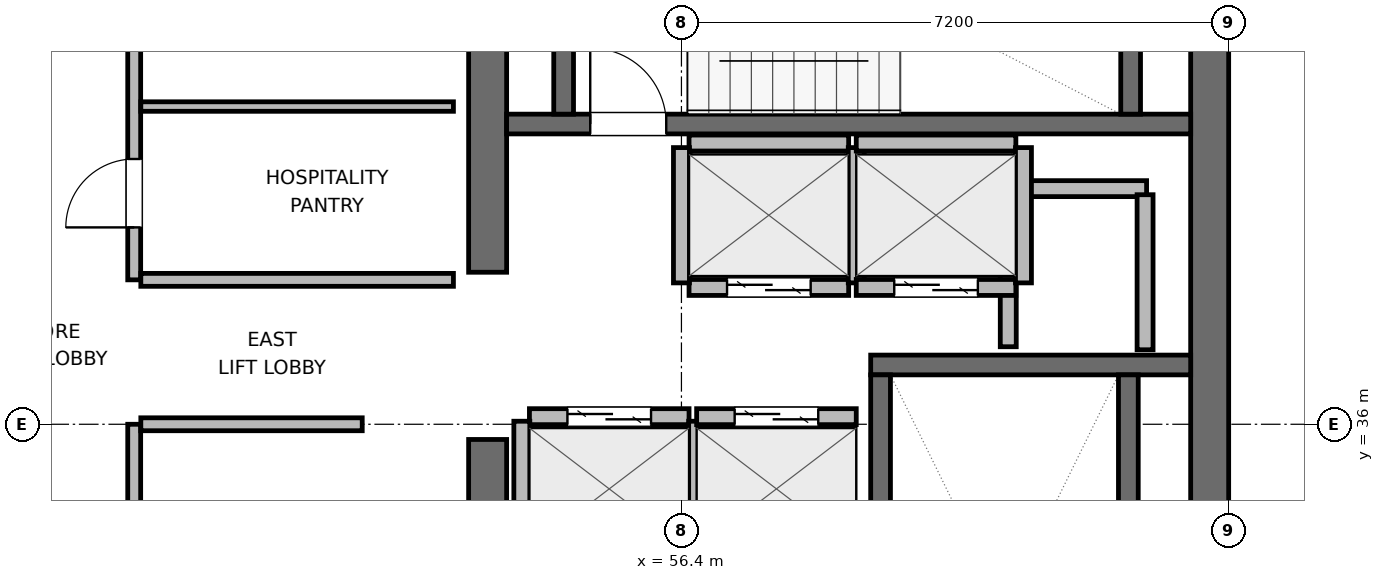
"""IFC4 building model, lengths in metres.
Left out: names, types, materials, properties, quantities, classifications, styles, units other than length and angle.
Written with IfcOpenShell. Run it as: python <this file> out.ifc"""

import sys

from ifc_helpers import new_model, si_unit, direction, frame, frame_2d, origin, place, context, subcontext, project, spatial, rectangle, extrude, element, fill, save


model = new_model("IFC4")
c1 = context("Model", 3, precision=1e-05, world=origin(), true_north=direction((0.0, 1.0)))
c2 = subcontext(c1, "Body", "Model", "MODEL_VIEW")
j1 = project(units=[si_unit("LENGTHUNIT", "METRE"), si_unit("PLANEANGLEUNIT", "RADIAN")], contexts=[c1])
p1 = place(None, origin())
s1 = spatial("IfcSite", under=j1, at=p1, CompositionType="ELEMENT")
p2 = place(p1, origin())
s2 = spatial("IfcBuilding", under=s1, at=p2, CompositionType="ELEMENT")
p3 = place(p2, frame((0.0, 0.0, 325.8)))
s3 = spatial("IfcBuildingStorey", under=s2, at=p3, CompositionType="ELEMENT", Elevation=325.8)
p4 = place(p3, frame((53.85, 27.85, 0.0), z_axis=(0.0, 0.0, 1.0), x_axis=(0.0, 1.0, 0.0)))
e1 = element("IfcWall", 1, at=p4, inside=s3, PredefinedType="SHEAR", context=c2, shape_type="SweptSolid", body=[
    extrude(rectangle(XDim=7.95, YDim=0.5, at=frame_2d((3.975, 0.0))), origin(), (0.0, 0.0, 1.0), 3.9),
])
p5 = place(p3, frame((53.85, 38.0, 0.0), z_axis=(0.0, 0.0, 1.0), x_axis=(0.0, 1.0, 0.0)))
e2 = element("IfcWall", 2, at=p5, inside=s3, PredefinedType="SHEAR", context=c2, shape_type="SweptSolid", body=[
    extrude(rectangle(XDim=6.15, YDim=0.5, at=frame_2d((3.075, 0.0))), origin(), (0.0, 0.0, 1.0), 3.9),
])
p6 = place(p3, frame((63.35, 27.6, 0.0), z_axis=(0.0, 0.0, 1.0), x_axis=(0.0, 1.0, 0.0)))
e3 = element("IfcWall", 3, at=p6, inside=s3, PredefinedType="SHEAR", context=c2, shape_type="SweptSolid", body=[
    extrude(rectangle(XDim=16.8, YDim=0.5, at=frame_2d((8.4, 0.0))), origin(), (0.0, 0.0, 1.0), 3.9),
])
p7 = place(p3, frame((58.89, 36.78, 0.0), z_axis=(0.0, 0.0, 1.0), x_axis=(1.0, 0.0, 0.0)))
e4 = element("IfcWall", 4, at=p7, inside=s3, PredefinedType="SHEAR", context=c2, shape_type="SweptSolid", body=[
    extrude(rectangle(XDim=4.21, YDim=0.26, at=frame_2d((2.105, 0.0))), origin(), (0.0, 0.0, 1.0), 3.9),
])
p8 = place(p3, frame((59.02, 29.05, 0.0), z_axis=(0.0, 0.0, 1.0), x_axis=(0.0, 1.0, 0.0)))
e5 = element("IfcWall", 5, at=p8, inside=s3, PredefinedType="SHEAR", context=c2, shape_type="SweptSolid", body=[
    extrude(rectangle(XDim=7.6, YDim=0.26, at=frame_2d((3.8, 0.0))), origin(), (0.0, 0.0, 1.0), 3.9),
])
p9 = place(p8, frame((0.3, 0.0, 0.0)))
e6 = element("IfcOpeningElement", 6, at=p9, cuts=e5, PredefinedType="OPENING", context=c2, shape_type="SweptSolid", body=[
    extrude(rectangle(XDim=1.0, YDim=2.04, at=frame_2d((0.5, 1.02))), frame((0.0, 0.14, 0.0), z_axis=(0.0, -1.0, 0.0), x_axis=(1.0, 0.0, 0.0)), (0.0, 0.0, 1.0), 0.28),
])
p10 = place(p3, frame((62.28, 29.05, 0.0), z_axis=(0.0, 0.0, 1.0), x_axis=(0.0, 1.0, 0.0)))
e7 = element("IfcWall", 7, at=p10, inside=s3, PredefinedType="SHEAR", context=c2, shape_type="SweptSolid", body=[
    extrude(rectangle(XDim=7.6, YDim=0.26, at=frame_2d((3.8, 0.0))), origin(), (0.0, 0.0, 1.0), 3.9),
])
p11 = place(p3, frame((54.1, 39.95, 0.0), z_axis=(0.0, 0.0, 1.0), x_axis=(1.0, 0.0, 0.0)))
e8 = element("IfcWall", 8, at=p11, inside=s3, PredefinedType="SHEAR", context=c2, shape_type="SweptSolid", body=[
    extrude(rectangle(XDim=9.0, YDim=0.26, at=frame_2d((4.5, 0.0))), origin(), (0.0, 0.0, 1.0), 3.9),
])
p12 = place(p11, frame((1.1, 0.0, 0.0)))
e9 = element("IfcOpeningElement", 9, at=p12, cuts=e8, PredefinedType="OPENING", context=c2, shape_type="SweptSolid", body=[
    extrude(rectangle(XDim=1.0, YDim=2.04, at=frame_2d((0.5, 1.02))), frame((0.0, 0.14, 0.0), z_axis=(0.0, -1.0, 0.0), x_axis=(1.0, 0.0, 0.0)), (0.0, 0.0, 1.0), 0.28),
])
for number, where, z_axis, x_axis in (
    (10, (54.85, 40.08, 0.0), (0.0, 0.0, 1.0), (0.0, 1.0, 0.0)),
    (11, (62.31, 40.08, 0.0), (0.0, 0.0, 1.0), (0.0, 1.0, 0.0)),
):
    element("IfcWall", number, at=place(p3, frame(where, z_axis=z_axis, x_axis=x_axis)), inside=s3, PredefinedType="SHEAR", context=c2, shape_type="SweptSolid", body=[
        extrude(rectangle(XDim=2.94, YDim=0.26, at=frame_2d((1.47, 0.0))), origin(), (0.0, 0.0, 1.0), 3.9),
    ])
p13 = place(p3, frame((60.72, 39.1, 0.0), z_axis=(0.0, 0.0, 1.0), x_axis=(1.0, 0.0, 0.0)))
e12 = element("IfcWall", 12, at=p13, inside=s3, PredefinedType="PARTITIONING", context=c2, shape_type="SweptSolid", body=[
    extrude(rectangle(XDim=1.8, YDim=0.21, at=frame_2d((0.9, 0.0))), origin(), (0.0, 0.0, 1.0), 3.68),
])
p14 = place(p3, frame((60.7, 37.02, 0.0), z_axis=(0.0, 0.0, 1.0), x_axis=(0.0, 1.0, 0.0)))
e13 = element("IfcWall", 13, at=p14, inside=s3, PredefinedType="PARTITIONING", context=c2, shape_type="SweptSolid", body=[
    extrude(rectangle(XDim=1.96, YDim=0.21, at=frame_2d((0.98, 0.0))), origin(), (0.0, 0.0, 1.0), 3.68),
])
p15 = place(p3, frame((62.5, 36.98, 0.0), z_axis=(0.0, 0.0, 1.0), x_axis=(0.0, 1.0, 0.0)))
e14 = element("IfcWall", 14, at=p15, inside=s3, PredefinedType="PARTITIONING", context=c2, shape_type="SweptSolid", body=[
    extrude(rectangle(XDim=2.04, YDim=0.21, at=frame_2d((1.02, 0.0))), origin(), (0.0, 0.0, 1.0), 3.68),
])
p16 = place(p3, frame((54.4, 36.1, 0.0), z_axis=(0.0, 0.0, 1.0), x_axis=(1.0, 0.0, 0.0)))
e15 = element("IfcWall", 15, at=p16, inside=s3, PredefinedType="PARTITIONING", context=c2, shape_type="SweptSolid", body=[
    extrude(rectangle(XDim=2.1, YDim=0.21, at=frame_2d((1.05, 0.0))), origin(), (0.0, 0.0, 1.0), 3.68),
])
p17 = place(p16, frame((0.5, 0.0, 0.0)))
e16 = element("IfcOpeningElement", 16, at=p17, cuts=e15, PredefinedType="OPENING", context=c2, shape_type="SweptSolid", body=[
    extrude(rectangle(XDim=1.1, YDim=2.04, at=frame_2d((0.55, 1.02))), frame((0.0, 0.115, 0.0), z_axis=(0.0, -1.0, 0.0), x_axis=(1.0, 0.0, 0.0)), (0.0, 0.0, 1.0), 0.23),
])
for number, where, z_axis, x_axis in (
    (17, (54.3, 34.26, 0.0), (0.0, 0.0, 1.0), (0.0, 1.0, 0.0)),
    (18, (56.6, 34.26, 0.0), (0.0, 0.0, 1.0), (0.0, 1.0, 0.0)),
):
    element("IfcWall", number, at=place(p3, frame(where, z_axis=z_axis, x_axis=x_axis)), inside=s3, PredefinedType="PARTITIONING", context=c2, shape_type="SweptSolid", body=[
        extrude(rectangle(XDim=1.78, YDim=0.21, at=frame_2d((0.89, 0.0))), origin(), (0.0, 0.0, 1.0), 3.68),
    ])
p18 = place(p3, frame((56.6, 36.1, 0.0), z_axis=(0.0, 0.0, 1.0), x_axis=(1.0, 0.0, 0.0)))
e19 = element("IfcWall", 19, at=p18, inside=s3, PredefinedType="PARTITIONING", context=c2, shape_type="SweptSolid", body=[
    extrude(rectangle(XDim=2.1, YDim=0.21, at=frame_2d((1.05, 0.0))), origin(), (0.0, 0.0, 1.0), 3.68),
])
p19 = place(p18, frame((0.5, 0.0, 0.0)))
e20 = element("IfcOpeningElement", 20, at=p19, cuts=e19, PredefinedType="OPENING", context=c2, shape_type="SweptSolid", body=[
    extrude(rectangle(XDim=1.1, YDim=2.04, at=frame_2d((0.55, 1.02))), frame((0.0, 0.115, 0.0), z_axis=(0.0, -1.0, 0.0), x_axis=(1.0, 0.0, 0.0)), (0.0, 0.0, 1.0), 0.23),
])
p20 = place(p3, frame((56.5, 37.8, 0.0), z_axis=(0.0, 0.0, 1.0), x_axis=(1.0, 0.0, 0.0)))
e21 = element("IfcWall", 21, at=p20, inside=s3, PredefinedType="PARTITIONING", context=c2, shape_type="SweptSolid", body=[
    extrude(rectangle(XDim=2.1, YDim=0.21, at=frame_2d((1.05, 0.0))), origin(), (0.0, 0.0, 1.0), 3.68),
])
p21 = place(p20, frame((0.5, 0.0, 0.0)))
e22 = element("IfcOpeningElement", 22, at=p21, cuts=e21, PredefinedType="OPENING", context=c2, shape_type="SweptSolid", body=[
    extrude(rectangle(XDim=1.1, YDim=2.04, at=frame_2d((0.55, 1.02))), frame((0.0, 0.115, 0.0), z_axis=(0.0, -1.0, 0.0), x_axis=(1.0, 0.0, 0.0)), (0.0, 0.0, 1.0), 0.23),
])
p22 = place(p3, frame((56.5, 39.7, 0.0), z_axis=(0.0, 0.0, 1.0), x_axis=(1.0, 0.0, 0.0)))
e23 = element("IfcWall", 23, at=p22, inside=s3, PredefinedType="PARTITIONING", context=c2, shape_type="SweptSolid", body=[
    extrude(rectangle(XDim=2.1, YDim=0.21, at=frame_2d((1.05, 0.0))), origin(), (0.0, 0.0, 1.0), 3.68),
])
for number, where, z_axis, x_axis in (
    (24, (56.4, 37.86, 0.0), (0.0, 0.0, 1.0), (0.0, 1.0, 0.0)),
    (25, (58.7, 37.86, 0.0), (0.0, 0.0, 1.0), (0.0, 1.0, 0.0)),
):
    element("IfcWall", number, at=place(p3, frame(where, z_axis=z_axis, x_axis=x_axis)), inside=s3, PredefinedType="PARTITIONING", context=c2, shape_type="SweptSolid", body=[
        extrude(rectangle(XDim=1.78, YDim=0.21, at=frame_2d((0.89, 0.0))), origin(), (0.0, 0.0, 1.0), 3.68),
    ])
p23 = place(p3, frame((58.7, 37.8, 0.0), z_axis=(0.0, 0.0, 1.0), x_axis=(1.0, 0.0, 0.0)))
e26 = element("IfcWall", 26, at=p23, inside=s3, PredefinedType="PARTITIONING", context=c2, shape_type="SweptSolid", body=[
    extrude(rectangle(XDim=2.1, YDim=0.21, at=frame_2d((1.05, 0.0))), origin(), (0.0, 0.0, 1.0), 3.68),
])
p24 = place(p23, frame((0.5, 0.0, 0.0)))
e27 = element("IfcOpeningElement", 27, at=p24, cuts=e26, PredefinedType="OPENING", context=c2, shape_type="SweptSolid", body=[
    extrude(rectangle(XDim=1.1, YDim=2.04, at=frame_2d((0.55, 1.02))), frame((0.0, 0.115, 0.0), z_axis=(0.0, -1.0, 0.0), x_axis=(1.0, 0.0, 0.0)), (0.0, 0.0, 1.0), 0.23),
])
p25 = place(p3, frame((58.7, 39.7, 0.0), z_axis=(0.0, 0.0, 1.0), x_axis=(1.0, 0.0, 0.0)))
e28 = element("IfcWall", 28, at=p25, inside=s3, PredefinedType="PARTITIONING", context=c2, shape_type="SweptSolid", body=[
    extrude(rectangle(XDim=2.1, YDim=0.21, at=frame_2d((1.05, 0.0))), origin(), (0.0, 0.0, 1.0), 3.68),
])
p26 = place(p3, frame((60.9, 37.86, 0.0), z_axis=(0.0, 0.0, 1.0), x_axis=(0.0, 1.0, 0.0)))
e29 = element("IfcWall", 29, at=p26, inside=s3, PredefinedType="PARTITIONING", context=c2, shape_type="SweptSolid", body=[
    extrude(rectangle(XDim=1.78, YDim=0.21, at=frame_2d((0.89, 0.0))), origin(), (0.0, 0.0, 1.0), 3.68),
])
p27 = place(p3, frame((49.2, 32.6, 0.0), z_axis=(0.0, 0.0, 1.0), x_axis=(0.0, 1.0, 0.0)))
e30 = element("IfcWall", 30, at=p27, inside=s3, PredefinedType="PARTITIONING", context=c2, shape_type="SweptSolid", body=[
    extrude(rectangle(XDim=3.4, YDim=0.17, at=frame_2d((1.7, 0.0))), origin(), (0.0, 0.0, 1.0), 3.68),
])
p28 = place(p27, frame((0.638, 0.0, 0.0)))
e31 = element("IfcOpeningElement", 31, at=p28, cuts=e30, PredefinedType="OPENING", context=c2, shape_type="SweptSolid", body=[
    extrude(rectangle(XDim=0.9, YDim=2.02, at=frame_2d((0.45, 1.01))), frame((0.0, 0.095, 0.0), z_axis=(0.0, -1.0, 0.0), x_axis=(1.0, 0.0, 0.0)), (0.0, 0.0, 1.0), 0.19),
])
p29 = place(p3, frame((49.287, 36.0, 0.0), z_axis=(0.0, 0.0, 1.0), x_axis=(1.0, 0.0, 0.0)))
e32 = element("IfcWall", 32, at=p29, inside=s3, PredefinedType="PARTITIONING", context=c2, shape_type="SweptSolid", body=[
    extrude(rectangle(XDim=2.913, YDim=0.17, at=frame_2d((1.457, 0.0))), origin(), (0.0, 0.0, 1.0), 3.68),
])
p30 = place(p3, frame((49.2, 37.9, 0.0), z_axis=(0.0, 0.0, 1.0), x_axis=(0.0, 1.0, 0.0)))
e33 = element("IfcWall", 33, at=p30, inside=s3, PredefinedType="PARTITIONING", context=c2, shape_type="SweptSolid", body=[
    extrude(rectangle(XDim=6.0, YDim=0.17, at=frame_2d((3.0, 0.0))), origin(), (0.0, 0.0, 1.0), 3.68),
])
p31 = place(p30, frame((0.69, 0.0, 0.0)))
e34 = element("IfcOpeningElement", 34, at=p31, cuts=e33, PredefinedType="OPENING", context=c2, shape_type="SweptSolid", body=[
    extrude(rectangle(XDim=0.9, YDim=2.02, at=frame_2d((0.45, 1.01))), frame((0.0, 0.095, 0.0), z_axis=(0.0, -1.0, 0.0), x_axis=(1.0, 0.0, 0.0)), (0.0, 0.0, 1.0), 0.19),
])
p32 = place(p30, frame((3.69, 0.0, 0.0)))
e35 = element("IfcOpeningElement", 35, at=p32, cuts=e33, PredefinedType="OPENING", context=c2, shape_type="SweptSolid", body=[
    extrude(rectangle(XDim=0.9, YDim=2.02, at=frame_2d((0.45, 1.01))), frame((0.0, 0.095, 0.0), z_axis=(0.0, -1.0, 0.0), x_axis=(1.0, 0.0, 0.0)), (0.0, 0.0, 1.0), 0.19),
])
p33 = place(p3, frame((49.287, 37.9, 0.0), z_axis=(0.0, 0.0, 1.0), x_axis=(1.0, 0.0, 0.0)))
e36 = element("IfcWall", 36, at=p33, inside=s3, PredefinedType="PARTITIONING", context=c2, shape_type="SweptSolid", body=[
    extrude(rectangle(XDim=4.113, YDim=0.17, at=frame_2d((2.056, 0.0))), origin(), (0.0, 0.0, 1.0), 3.68),
])
p34 = place(p3, frame((49.287, 40.18, 0.0), z_axis=(0.0, 0.0, 1.0), x_axis=(1.0, 0.0, 0.0)))
e37 = element("IfcWall", 37, at=p34, inside=s3, PredefinedType="PARTITIONING", context=c2, shape_type="SweptSolid", body=[
    extrude(rectangle(XDim=4.113, YDim=0.125, at=frame_2d((2.056, 0.0))), origin(), (0.0, 0.0, 1.0), 3.68),
])
p35 = place(p12, origin())
e38 = element("IfcDoor", 38, at=p35, inside=s3, OperationType="SINGLE_SWING_LEFT", PredefinedType="DOOR", context=c2, shape_type="SweptSolid", body=[
    extrude(rectangle(XDim=1.0, YDim=2.04, at=frame_2d((0.5, 1.02))), frame((0.0, 0.025, 0.0), z_axis=(0.0, -1.0, 0.0), x_axis=(1.0, 0.0, 0.0)), (0.0, 0.0, 1.0), 0.05),
])
fill(e9, e38)
p36 = place(p17, origin())
e39 = element("IfcDoor", 39, at=p36, inside=s3, OperationType="DOUBLE_DOOR_SLIDING", PredefinedType="DOOR", context=c2, shape_type="SweptSolid", body=[
    extrude(rectangle(XDim=1.1, YDim=2.04, at=frame_2d((0.55, 1.02))), frame((0.0, 0.025, 0.0), z_axis=(0.0, -1.0, 0.0), x_axis=(1.0, 0.0, 0.0)), (0.0, 0.0, 1.0), 0.05),
])
fill(e16, e39)
p37 = place(p19, origin())
e40 = element("IfcDoor", 40, at=p37, inside=s3, OperationType="DOUBLE_DOOR_SLIDING", PredefinedType="DOOR", context=c2, shape_type="SweptSolid", body=[
    extrude(rectangle(XDim=1.1, YDim=2.04, at=frame_2d((0.55, 1.02))), frame((0.0, 0.025, 0.0), z_axis=(0.0, -1.0, 0.0), x_axis=(1.0, 0.0, 0.0)), (0.0, 0.0, 1.0), 0.05),
])
fill(e20, e40)
p38 = place(p21, origin())
e41 = element("IfcDoor", 41, at=p38, inside=s3, OperationType="DOUBLE_DOOR_SLIDING", PredefinedType="DOOR", context=c2, shape_type="SweptSolid", body=[
    extrude(rectangle(XDim=1.1, YDim=2.04, at=frame_2d((0.55, 1.02))), frame((0.0, 0.025, 0.0), z_axis=(0.0, -1.0, 0.0), x_axis=(1.0, 0.0, 0.0)), (0.0, 0.0, 1.0), 0.05),
])
fill(e22, e41)
p39 = place(p24, origin())
e42 = element("IfcDoor", 42, at=p39, inside=s3, OperationType="DOUBLE_DOOR_SLIDING", PredefinedType="DOOR", context=c2, shape_type="SweptSolid", body=[
    extrude(rectangle(XDim=1.1, YDim=2.04, at=frame_2d((0.55, 1.02))), frame((0.0, 0.025, 0.0), z_axis=(0.0, -1.0, 0.0), x_axis=(1.0, 0.0, 0.0)), (0.0, 0.0, 1.0), 0.05),
])
fill(e27, e42)
p40 = place(p31, origin())
e43 = element("IfcDoor", 43, at=p40, inside=s3, OperationType="SINGLE_SWING_LEFT", PredefinedType="DOOR", context=c2, shape_type="SweptSolid", body=[
    extrude(rectangle(XDim=0.9, YDim=2.02, at=frame_2d((0.45, 1.01))), frame((0.0, 0.025, 0.0), z_axis=(0.0, -1.0, 0.0), x_axis=(1.0, 0.0, 0.0)), (0.0, 0.0, 1.0), 0.05),
])
fill(e34, e43)
save(model, sys.argv[1])
